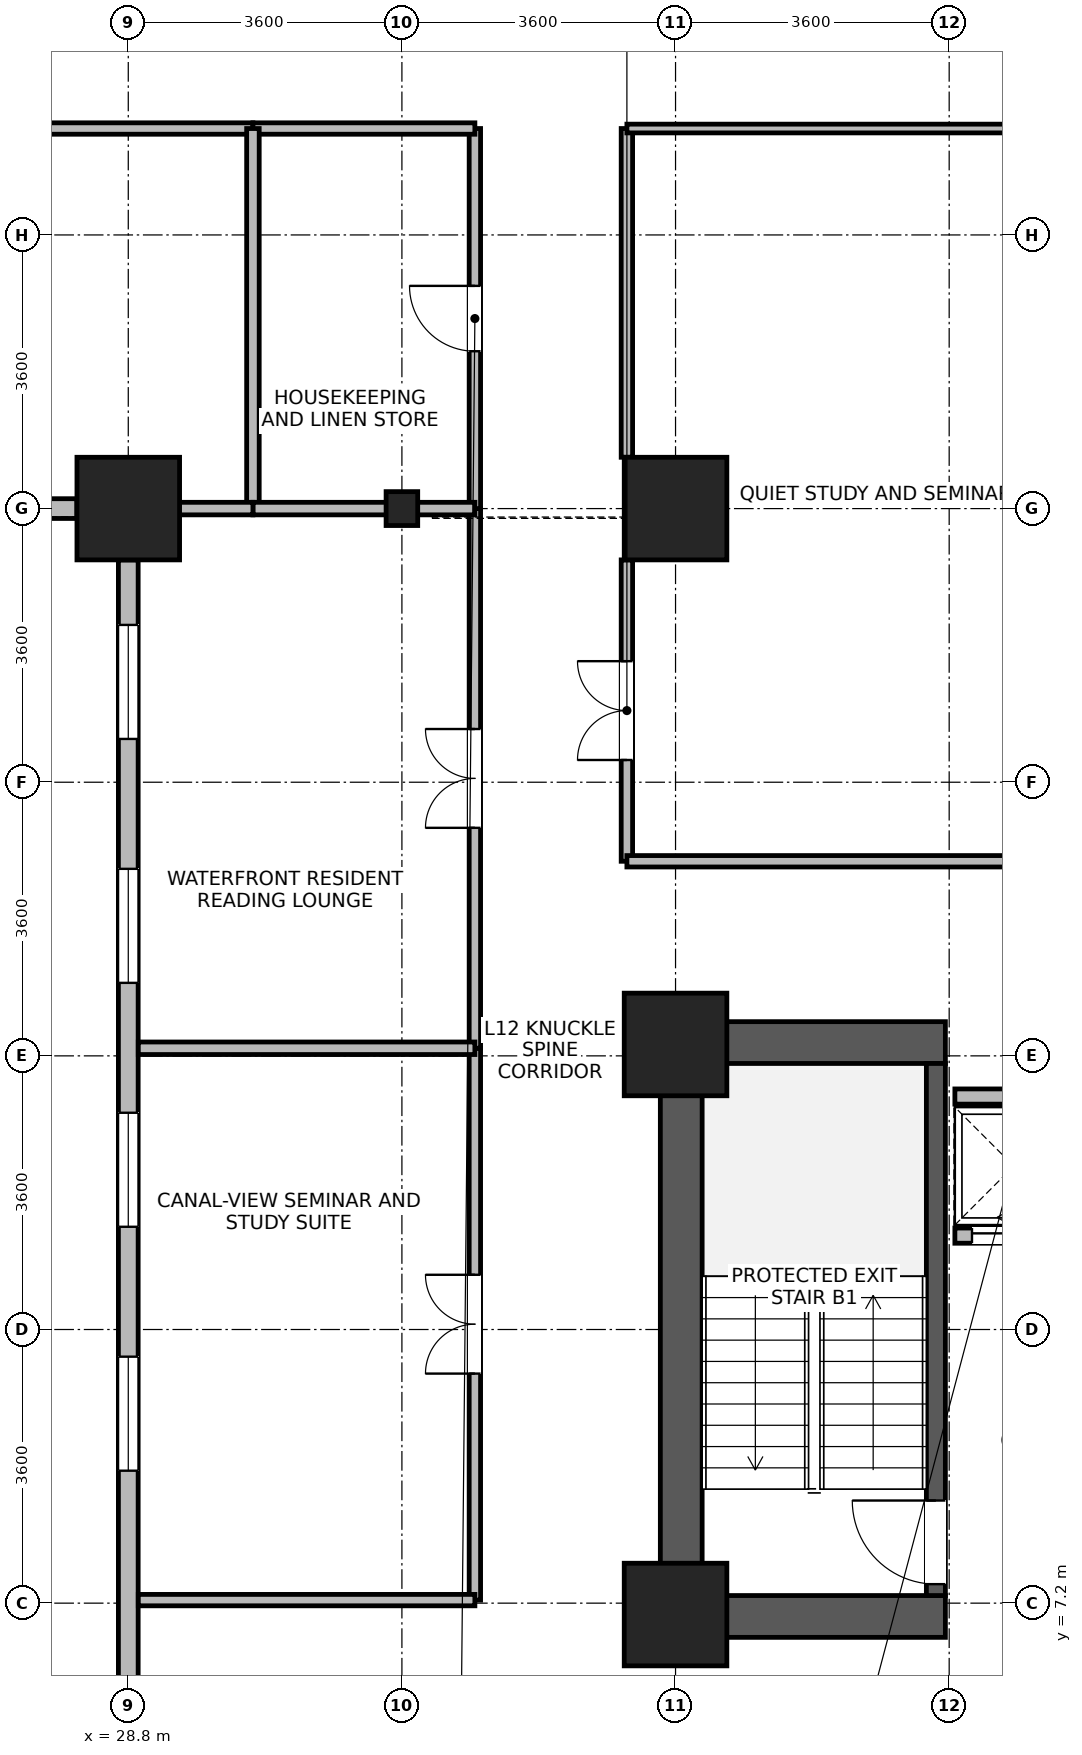
"""IFC4 building model, lengths in metres.
Left out: names, types, materials, properties, quantities, classifications, styles, units other than length and angle.
Written with IfcOpenShell. Run it as: python <this file> out.ifc"""

import sys

from ifc_helpers import new_model, si_unit, direction, frame, frame_2d, origin, origin_2d, place, context, subcontext, project, spatial, rectangle, i_section, extrude, source, transform, mapped, element, fill, save


model = new_model("IFC4")
c1 = context("Model", 3, precision=1e-05, world=origin(), true_north=direction((0.0, 1.0)))
c2 = subcontext(c1, "Body", "Model", "MODEL_VIEW")
j1 = project(units=[si_unit("LENGTHUNIT", "METRE"), si_unit("PLANEANGLEUNIT", "RADIAN")], contexts=[c1])
p1 = place(None, origin())
s1 = spatial("IfcSite", under=j1, at=p1, CompositionType="ELEMENT")
p2 = place(p1, origin())
s2 = spatial("IfcBuilding", under=s1, at=p2, CompositionType="ELEMENT")
p3 = place(p2, frame((0.0, 0.0, 51.2)))
s3 = spatial("IfcBuildingStorey", under=s2, at=p3, CompositionType="ELEMENT", Elevation=51.2)
p4 = place(p3, frame((36.075, 6.75, 0.0), z_axis=(0.0, 0.0, 1.0), x_axis=(0.0, 1.0, 0.0)))
e1 = element("IfcWall", 1, at=p4, inside=s3, PredefinedType="SHEAR", context=c2, shape_type="SweptSolid", body=[
    extrude(rectangle(XDim=8.1, YDim=0.55, at=frame_2d((4.05, 0.0))), origin(), (0.0, 0.0, 1.0), 3.45),
])
for number, where, z_axis, x_axis in (
    (2, (36.35, 7.025, 0.0), (0.0, 0.0, 1.0), (1.0, 0.0, 0.0)),
    (3, (36.35, 14.575, 0.0), (0.0, 0.0, 1.0), (1.0, 0.0, 0.0)),
):
    element("IfcWall", number, at=place(p3, frame(where, z_axis=z_axis, x_axis=x_axis)), inside=s3, PredefinedType="SHEAR", context=c2, shape_type="SweptSolid", body=[
        extrude(rectangle(XDim=3.2, YDim=0.55, at=frame_2d((1.6, 0.0))), origin(), (0.0, 0.0, 1.0), 3.45),
    ])
p5 = place(p3, frame((39.425, 7.3, 0.0), z_axis=(0.0, 0.0, 1.0), x_axis=(0.0, 1.0, 0.0)))
e4 = element("IfcWall", 4, at=p5, inside=s3, PredefinedType="SHEAR", context=c2, shape_type="SweptSolid", body=[
    extrude(rectangle(XDim=7.0, YDim=0.25, at=frame_2d((3.5, 0.0))), origin(), (0.0, 0.0, 1.0), 3.45),
])
p6 = place(p5, frame((0.15, 0.0, 0.0)))
e5 = element("IfcOpeningElement", 5, at=p6, cuts=e4, PredefinedType="OPENING", context=c2, shape_type="SweptSolid", body=[
    extrude(rectangle(XDim=1.1, YDim=2.08, at=frame_2d((0.55, 1.04))), frame((0.0, 0.135, 0.0), z_axis=(0.0, -1.0, 0.0), x_axis=(1.0, 0.0, 0.0)), (0.0, 0.0, 1.0), 0.27),
])
m1 = source(origin(), c2, "Body", "SweptSolid", [
    extrude(rectangle(XDim=1.35, YDim=1.35, at=origin_2d()), origin(), (0.0, 0.0, 1.0), 3.7),
])
for number, where, z_axis, x_axis in (
    (6, (28.8, 21.6, 0.0), (0.0, 0.0, 1.0), (1.0, 0.0, 0.0)),
    (7, (36.0, 21.6, 0.0), (0.0, 0.0, 1.0), (1.0, 0.0, 0.0)),
    (8, (36.0, 7.05, 0.0), (0.0, 0.0, 1.0), (1.0, 0.0, 0.0)),
    (9, (36.0, 14.55, 0.0), (0.0, 0.0, 1.0), (1.0, 0.0, 0.0)),
):
    element("IfcColumn", number, at=place(p3, frame(where, z_axis=z_axis, x_axis=x_axis)), inside=s3, PredefinedType="COLUMN", context=c2, shape_type="MappedRepresentation", body=[
        mapped(m1, transform((0.0, 0.0, 0.0), x_axis=(1.0, 0.0, 0.0), y_axis=(0.0, 1.0, 0.0), z_axis=(0.0, 0.0, 1.0), scale=1.0)),
    ])
m2 = source(origin(), c2, "Body", "SweptSolid", [
    extrude(i_section(OverallWidth=0.416, OverallDepth=0.446, WebThickness=0.029, FlangeThickness=0.04, FilletRadius=0.015, at=origin_2d()), origin(), (0.0, 0.0, 1.0), 3.7),
])
p7 = place(p3, frame((32.4, 21.6, 0.0), z_axis=(0.0, 0.0, 1.0), x_axis=(1.0, 0.0, 0.0)))
e10 = element("IfcColumn", 10, at=p7, inside=s3, PredefinedType="COLUMN", context=c2, shape_type="MappedRepresentation", body=[
    mapped(m2, transform((0.0, 0.0, 0.0), x_axis=(1.0, 0.0, 0.0), y_axis=(0.0, 1.0, 0.0), z_axis=(0.0, 0.0, 1.0), scale=1.0)),
])
p8 = place(p3, frame((28.124, 21.6, 0.0), z_axis=(0.0, 0.0, 1.0), x_axis=(-1.0, 0.0, 0.0)))
e11 = element("IfcWall", 11, at=p8, inside=s3, PredefinedType="STANDARD", context=c2, shape_type="SweptSolid", body=[
    extrude(rectangle(XDim=2.715, YDim=0.26, at=frame_2d((1.357, 0.0))), origin(), (0.0, 0.0, 1.0), 2.93),
])
p9 = place(p8, frame((0.883, 0.0, 0.85)))
e12 = element("IfcOpeningElement", 12, at=p9, cuts=e11, PredefinedType="OPENING", context=c2, shape_type="SweptSolid", body=[
    extrude(rectangle(XDim=0.95, YDim=1.75, at=frame_2d((0.475, 0.875))), frame((0.0, 0.14, 0.0), z_axis=(0.0, -1.0, 0.0), x_axis=(1.0, 0.0, 0.0)), (0.0, 0.0, 1.0), 0.28),
])
p10 = place(p3, frame((28.8, 1.67, 0.0), z_axis=(0.0, 0.0, 1.0), x_axis=(0.0, 1.0, 0.0)))
e13 = element("IfcWall", 13, at=p10, inside=s3, PredefinedType="STANDARD", context=c2, shape_type="SweptSolid", body=[
    extrude(rectangle(XDim=19.254, YDim=0.26, at=frame_2d((9.627, 0.0))), origin(), (0.0, 0.0, 1.0), 3.43),
])
p11 = place(p10, frame((0.854, 0.0, 0.85)))
e14 = element("IfcOpeningElement", 14, at=p11, cuts=e13, PredefinedType="OPENING", context=c2, shape_type="SweptSolid", body=[
    extrude(rectangle(XDim=1.5, YDim=1.85, at=frame_2d((0.75, 0.925))), frame((0.0, 0.14, 0.0), z_axis=(0.0, -1.0, 0.0), x_axis=(1.0, 0.0, 0.0)), (0.0, 0.0, 1.0), 0.28),
])
p12 = place(p10, frame((7.272, 0.0, 0.85)))
e15 = element("IfcOpeningElement", 15, at=p12, cuts=e13, PredefinedType="OPENING", context=c2, shape_type="SweptSolid", body=[
    extrude(rectangle(XDim=1.5, YDim=1.85, at=frame_2d((0.75, 0.925))), frame((0.0, 0.14, 0.0), z_axis=(0.0, -1.0, 0.0), x_axis=(1.0, 0.0, 0.0)), (0.0, 0.0, 1.0), 0.28),
])
p13 = place(p10, frame((10.481, 0.0, 0.85)))
e16 = element("IfcOpeningElement", 16, at=p13, cuts=e13, PredefinedType="OPENING", context=c2, shape_type="SweptSolid", body=[
    extrude(rectangle(XDim=1.5, YDim=1.85, at=frame_2d((0.75, 0.925))), frame((0.0, 0.14, 0.0), z_axis=(0.0, -1.0, 0.0), x_axis=(1.0, 0.0, 0.0)), (0.0, 0.0, 1.0), 0.28),
])
p14 = place(p10, frame((13.69, 0.0, 0.85)))
e17 = element("IfcOpeningElement", 17, at=p14, cuts=e13, PredefinedType="OPENING", context=c2, shape_type="SweptSolid", body=[
    extrude(rectangle(XDim=1.5, YDim=1.85, at=frame_2d((0.75, 0.925))), frame((0.0, 0.14, 0.0), z_axis=(0.0, -1.0, 0.0), x_axis=(1.0, 0.0, 0.0)), (0.0, 0.0, 1.0), 0.28),
])
p15 = place(p10, frame((16.899, 0.0, 0.85)))
e18 = element("IfcOpeningElement", 18, at=p15, cuts=e13, PredefinedType="OPENING", context=c2, shape_type="SweptSolid", body=[
    extrude(rectangle(XDim=1.5, YDim=1.85, at=frame_2d((0.75, 0.925))), frame((0.0, 0.14, 0.0), z_axis=(0.0, -1.0, 0.0), x_axis=(1.0, 0.0, 0.0)), (0.0, 0.0, 1.0), 0.28),
])
p16 = place(p3, frame((39.675, 12.035, 0.0), z_axis=(0.0, 0.0, 1.0), x_axis=(1.0, 0.0, 0.0)))
e19 = element("IfcWall", 19, at=p16, inside=s3, PredefinedType="PARTITIONING", context=c2, shape_type="SweptSolid", body=[
    extrude(rectangle(XDim=1.55, YDim=0.2, at=frame_2d((0.775, 0.0))), origin(), (0.0, 0.0, 1.0), 3.43),
])
p17 = place(p16, frame((0.225, 0.0, 0.0)))
e20 = element("IfcOpeningElement", 20, at=p17, cuts=e19, PredefinedType="OPENING", context=c2, shape_type="SweptSolid", body=[
    extrude(rectangle(XDim=1.1, YDim=2.12, at=frame_2d((0.55, 1.06))), frame((0.0, 0.11, 0.0), z_axis=(0.0, -1.0, 0.0), x_axis=(1.0, 0.0, 0.0)), (0.0, 0.0, 1.0), 0.22),
])
p18 = place(p3, frame((39.675, 13.865, 0.0), z_axis=(0.0, 0.0, 1.0), x_axis=(1.0, 0.0, 0.0)))
e21 = element("IfcWall", 21, at=p18, inside=s3, PredefinedType="PARTITIONING", context=c2, shape_type="SweptSolid", body=[
    extrude(rectangle(XDim=1.55, YDim=0.2, at=frame_2d((0.775, 0.0))), origin(), (0.0, 0.0, 1.0), 3.43),
])
p19 = place(p3, frame((18.04, 26.6, 0.0), z_axis=(0.0, 0.0, 1.0), x_axis=(1.0, 0.0, 0.0)))
e22 = element("IfcWall", 22, at=p19, inside=s3, PredefinedType="PARTITIONING", context=c2, shape_type="SweptSolid", body=[
    extrude(rectangle(XDim=12.4, YDim=0.15, at=frame_2d((6.2, 0.0))), origin(), (0.0, 0.0, 1.0), 3.43),
])
p20 = place(p19, frame((5.55, 0.0, 0.0)))
e23 = element("IfcOpeningElement", 23, at=p20, cuts=e22, PredefinedType="OPENING", context=c2, shape_type="SweptSolid", body=[
    extrude(rectangle(XDim=1.3, YDim=2.12, at=frame_2d((0.65, 1.06))), frame((0.0, 0.085, 0.0), z_axis=(0.0, -1.0, 0.0), x_axis=(1.0, 0.0, 0.0)), (0.0, 0.0, 1.0), 0.17),
])
p21 = place(p3, frame((35.36, 16.96, 0.0), z_axis=(0.0, 0.0, 1.0), x_axis=(0.0, 1.0, 0.0)))
e24 = element("IfcWall", 24, at=p21, inside=s3, PredefinedType="PARTITIONING", context=c2, shape_type="SweptSolid", body=[
    extrude(rectangle(XDim=3.965, YDim=0.15, at=frame_2d((1.982, 0.0))), origin(), (0.0, 0.0, 1.0), 3.43),
])
p22 = place(p21, frame((1.333, 0.0, 0.0)))
e25 = element("IfcOpeningElement", 25, at=p22, cuts=e24, PredefinedType="OPENING", context=c2, shape_type="SweptSolid", body=[
    extrude(rectangle(XDim=1.3, YDim=2.12, at=frame_2d((0.65, 1.06))), frame((0.0, 0.085, 0.0), z_axis=(0.0, -1.0, 0.0), x_axis=(1.0, 0.0, 0.0)), (0.0, 0.0, 1.0), 0.17),
])
p23 = place(p3, frame((35.36, 22.275, 0.0), z_axis=(0.0, 0.0, 1.0), x_axis=(0.0, 1.0, 0.0)))
e26 = element("IfcWall", 26, at=p23, inside=s3, PredefinedType="PARTITIONING", context=c2, shape_type="SweptSolid", body=[
    extrude(rectangle(XDim=4.325, YDim=0.15, at=frame_2d((2.163, 0.0))), origin(), (0.0, 0.0, 1.0), 3.43),
])
p24 = place(p3, frame((35.36, 16.96, 0.0), z_axis=(0.0, 0.0, 1.0), x_axis=(1.0, 0.0, 0.0)))
e27 = element("IfcWall", 27, at=p24, inside=s3, PredefinedType="PARTITIONING", context=c2, shape_type="SweptSolid", body=[
    extrude(rectangle(XDim=7.42, YDim=0.15, at=frame_2d((3.71, 0.0))), origin(), (0.0, 0.0, 1.0), 3.43),
])
p25 = place(p3, frame((33.36, 7.24, 0.0), z_axis=(0.0, 0.0, 1.0), x_axis=(0.0, 1.0, 0.0)))
e28 = element("IfcWall", 28, at=p25, inside=s3, PredefinedType="PARTITIONING", context=c2, shape_type="SweptSolid", body=[
    extrude(rectangle(XDim=7.26, YDim=0.15, at=frame_2d((3.63, 0.0))), origin(), (0.0, 0.0, 1.0), 3.43),
])
p26 = place(p25, frame((2.98, 0.0, 0.0)))
e29 = element("IfcOpeningElement", 29, at=p26, cuts=e28, PredefinedType="OPENING", context=c2, shape_type="SweptSolid", body=[
    extrude(rectangle(XDim=1.3, YDim=2.12, at=frame_2d((0.65, 1.06))), frame((0.0, 0.085, 0.0), z_axis=(0.0, -1.0, 0.0), x_axis=(1.0, 0.0, 0.0)), (0.0, 0.0, 1.0), 0.17),
])
p27 = place(p3, frame((33.36, 14.5, 0.0), z_axis=(0.0, 0.0, 1.0), x_axis=(0.0, 1.0, 0.0)))
e30 = element("IfcWall", 30, at=p27, inside=s3, PredefinedType="PARTITIONING", context=c2, shape_type="SweptSolid", body=[
    extrude(rectangle(XDim=7.1, YDim=0.15, at=frame_2d((3.55, 0.0))), origin(), (0.0, 0.0, 1.0), 3.43),
])
p28 = place(p27, frame((2.9, 0.0, 0.0)))
e31 = element("IfcOpeningElement", 31, at=p28, cuts=e30, PredefinedType="OPENING", context=c2, shape_type="SweptSolid", body=[
    extrude(rectangle(XDim=1.3, YDim=2.12, at=frame_2d((0.65, 1.06))), frame((0.0, 0.085, 0.0), z_axis=(0.0, -1.0, 0.0), x_axis=(1.0, 0.0, 0.0)), (0.0, 0.0, 1.0), 0.17),
])
p29 = place(p3, frame((33.36, 21.6, 0.0), z_axis=(0.0, 0.0, 1.0), x_axis=(0.0, 1.0, 0.0)))
e32 = element("IfcWall", 32, at=p29, inside=s3, PredefinedType="PARTITIONING", context=c2, shape_type="SweptSolid", body=[
    extrude(rectangle(XDim=5.0, YDim=0.15, at=frame_2d((2.5, 0.0))), origin(), (0.0, 0.0, 1.0), 3.43),
])
p30 = place(p29, frame((2.07, 0.0, 0.0)))
e33 = element("IfcOpeningElement", 33, at=p30, cuts=e32, PredefinedType="OPENING", context=c2, shape_type="SweptSolid", body=[
    extrude(rectangle(XDim=0.86, YDim=2.02, at=frame_2d((0.43, 1.01))), frame((0.0, 0.085, 0.0), z_axis=(0.0, -1.0, 0.0), x_axis=(1.0, 0.0, 0.0)), (0.0, 0.0, 1.0), 0.17),
])
p31 = place(p3, frame((28.932, 7.24, 0.0), z_axis=(0.0, 0.0, 1.0), x_axis=(1.0, 0.0, 0.0)))
e34 = element("IfcWall", 34, at=p31, inside=s3, PredefinedType="PARTITIONING", context=c2, shape_type="SweptSolid", body=[
    extrude(rectangle(XDim=4.428, YDim=0.15, at=frame_2d((2.214, 0.0))), origin(), (0.0, 0.0, 1.0), 3.43),
])
p32 = place(p3, frame((30.44, 26.6, 0.0), z_axis=(0.0, 0.0, 1.0), x_axis=(1.0, 0.0, 0.0)))
e35 = element("IfcWall", 35, at=p32, inside=s3, PredefinedType="PARTITIONING", context=c2, shape_type="SweptSolid", body=[
    extrude(rectangle(XDim=2.92, YDim=0.15, at=frame_2d((1.46, 0.0))), origin(), (0.0, 0.0, 1.0), 3.43),
])
p33 = place(p3, frame((35.36, 26.6, 0.0), z_axis=(0.0, 0.0, 1.0), x_axis=(1.0, 0.0, 0.0)))
e36 = element("IfcWall", 36, at=p33, inside=s3, PredefinedType="PARTITIONING", context=c2, shape_type="SweptSolid", body=[
    extrude(rectangle(XDim=7.42, YDim=0.115, at=frame_2d((3.71, 0.0))), origin(), (0.0, 0.0, 1.0), 3.43),
])
p34 = place(p3, frame((30.44, 21.6, 0.0), z_axis=(0.0, 0.0, 1.0), x_axis=(0.0, 1.0, 0.0)))
e37 = element("IfcWall", 37, at=p34, inside=s3, PredefinedType="PARTITIONING", context=c2, shape_type="SweptSolid", body=[
    extrude(rectangle(XDim=5.0, YDim=0.165, at=frame_2d((2.5, 0.0))), origin(), (0.0, 0.0, 1.0), 3.43),
])
p35 = place(p3, frame((28.932, 14.5, 0.0), z_axis=(0.0, 0.0, 1.0), x_axis=(1.0, 0.0, 0.0)))
e38 = element("IfcWall", 38, at=p35, inside=s3, PredefinedType="PARTITIONING", context=c2, shape_type="SweptSolid", body=[
    extrude(rectangle(XDim=4.428, YDim=0.165, at=frame_2d((2.214, 0.0))), origin(), (0.0, 0.0, 1.0), 3.43),
])
p36 = place(p3, frame((30.44, 21.6, 0.0), z_axis=(0.0, 0.0, 1.0), x_axis=(1.0, 0.0, 0.0)))
e39 = element("IfcWall", 39, at=p36, inside=s3, PredefinedType="PARTITIONING", context=c2, shape_type="SweptSolid", body=[
    extrude(rectangle(XDim=2.92, YDim=0.165, at=frame_2d((1.46, 0.0))), origin(), (0.0, 0.0, 1.0), 2.93),
])
p37 = place(p3, frame((28.932, 21.6, 0.0), z_axis=(0.0, 0.0, 1.0), x_axis=(1.0, 0.0, 0.0)))
e40 = element("IfcWall", 40, at=p37, inside=s3, PredefinedType="PARTITIONING", context=c2, shape_type="SweptSolid", body=[
    extrude(rectangle(XDim=1.508, YDim=0.165, at=frame_2d((0.754, 0.0))), origin(), (0.0, 0.0, 1.0), 2.93),
])
p38 = place(p12, origin())
e41 = element("IfcWindow", 41, at=p38, inside=s3, PartitioningType="SINGLE_PANEL", PredefinedType="WINDOW", context=c2, shape_type="SweptSolid", body=[
    extrude(rectangle(XDim=1.5, YDim=1.85, at=frame_2d((0.75, 0.925))), frame((0.0, 0.03, 0.0), z_axis=(0.0, -1.0, 0.0), x_axis=(1.0, 0.0, 0.0)), (0.0, 0.0, 1.0), 0.06),
])
fill(e15, e41)
p39 = place(p13, origin())
e42 = element("IfcWindow", 42, at=p39, inside=s3, PartitioningType="SINGLE_PANEL", PredefinedType="WINDOW", context=c2, shape_type="SweptSolid", body=[
    extrude(rectangle(XDim=1.5, YDim=1.85, at=frame_2d((0.75, 0.925))), frame((0.0, 0.03, 0.0), z_axis=(0.0, -1.0, 0.0), x_axis=(1.0, 0.0, 0.0)), (0.0, 0.0, 1.0), 0.06),
])
fill(e16, e42)
p40 = place(p14, origin())
e43 = element("IfcWindow", 43, at=p40, inside=s3, PartitioningType="SINGLE_PANEL", PredefinedType="WINDOW", context=c2, shape_type="SweptSolid", body=[
    extrude(rectangle(XDim=1.5, YDim=1.85, at=frame_2d((0.75, 0.925))), frame((0.0, 0.03, 0.0), z_axis=(0.0, -1.0, 0.0), x_axis=(1.0, 0.0, 0.0)), (0.0, 0.0, 1.0), 0.06),
])
fill(e17, e43)
p41 = place(p15, origin())
e44 = element("IfcWindow", 44, at=p41, inside=s3, PartitioningType="SINGLE_PANEL", PredefinedType="WINDOW", context=c2, shape_type="SweptSolid", body=[
    extrude(rectangle(XDim=1.5, YDim=1.85, at=frame_2d((0.75, 0.925))), frame((0.0, 0.03, 0.0), z_axis=(0.0, -1.0, 0.0), x_axis=(1.0, 0.0, 0.0)), (0.0, 0.0, 1.0), 0.06),
])
fill(e18, e44)
p42 = place(p6, origin())
e45 = element("IfcDoor", 45, at=p42, inside=s3, OperationType="SINGLE_SWING_RIGHT", PredefinedType="DOOR", context=c2, shape_type="SweptSolid", body=[
    extrude(rectangle(XDim=1.1, YDim=2.08, at=frame_2d((0.55, 1.04))), frame((0.0, 0.025, 0.0), z_axis=(0.0, -1.0, 0.0), x_axis=(1.0, 0.0, 0.0)), (0.0, 0.0, 1.0), 0.05),
])
fill(e5, e45)
p43 = place(p17, origin())
e46 = element("IfcDoor", 46, at=p43, inside=s3, OperationType="SLIDING_TO_LEFT", PredefinedType="DOOR", context=c2, shape_type="SweptSolid", body=[
    extrude(rectangle(XDim=1.1, YDim=2.12, at=frame_2d((0.55, 1.06))), frame((0.0, 0.025, 0.0), z_axis=(0.0, -1.0, 0.0), x_axis=(1.0, 0.0, 0.0)), (0.0, 0.0, 1.0), 0.05),
])
fill(e20, e46)
p44 = place(p22, origin())
e47 = element("IfcDoor", 47, at=p44, inside=s3, OperationType="DOUBLE_DOOR_SINGLE_SWING", PredefinedType="DOOR", context=c2, shape_type="SweptSolid", body=[
    extrude(rectangle(XDim=1.3, YDim=2.12, at=frame_2d((0.65, 1.06))), frame((0.0, 0.025, 0.0), z_axis=(0.0, -1.0, 0.0), x_axis=(1.0, 0.0, 0.0)), (0.0, 0.0, 1.0), 0.05),
])
fill(e25, e47)
p45 = place(p26, origin())
e48 = element("IfcDoor", 48, at=p45, inside=s3, OperationType="DOUBLE_DOOR_SINGLE_SWING", PredefinedType="DOOR", context=c2, shape_type="SweptSolid", body=[
    extrude(rectangle(XDim=1.3, YDim=2.12, at=frame_2d((0.65, 1.06))), frame((0.0, 0.025, 0.0), z_axis=(0.0, -1.0, 0.0), x_axis=(1.0, 0.0, 0.0)), (0.0, 0.0, 1.0), 0.05),
])
fill(e29, e48)
p46 = place(p28, origin())
e49 = element("IfcDoor", 49, at=p46, inside=s3, OperationType="DOUBLE_DOOR_SINGLE_SWING", PredefinedType="DOOR", context=c2, shape_type="SweptSolid", body=[
    extrude(rectangle(XDim=1.3, YDim=2.12, at=frame_2d((0.65, 1.06))), frame((0.0, 0.025, 0.0), z_axis=(0.0, -1.0, 0.0), x_axis=(1.0, 0.0, 0.0)), (0.0, 0.0, 1.0), 0.05),
])
fill(e31, e49)
p47 = place(p30, origin())
e50 = element("IfcDoor", 50, at=p47, inside=s3, OperationType="SINGLE_SWING_RIGHT", PredefinedType="DOOR", context=c2, shape_type="SweptSolid", body=[
    extrude(rectangle(XDim=0.86, YDim=2.02, at=frame_2d((0.43, 1.01))), frame((0.0, 0.025, 0.0), z_axis=(0.0, -1.0, 0.0), x_axis=(1.0, 0.0, 0.0)), (0.0, 0.0, 1.0), 0.05),
])
fill(e33, e50)
save(model, sys.argv[1])
